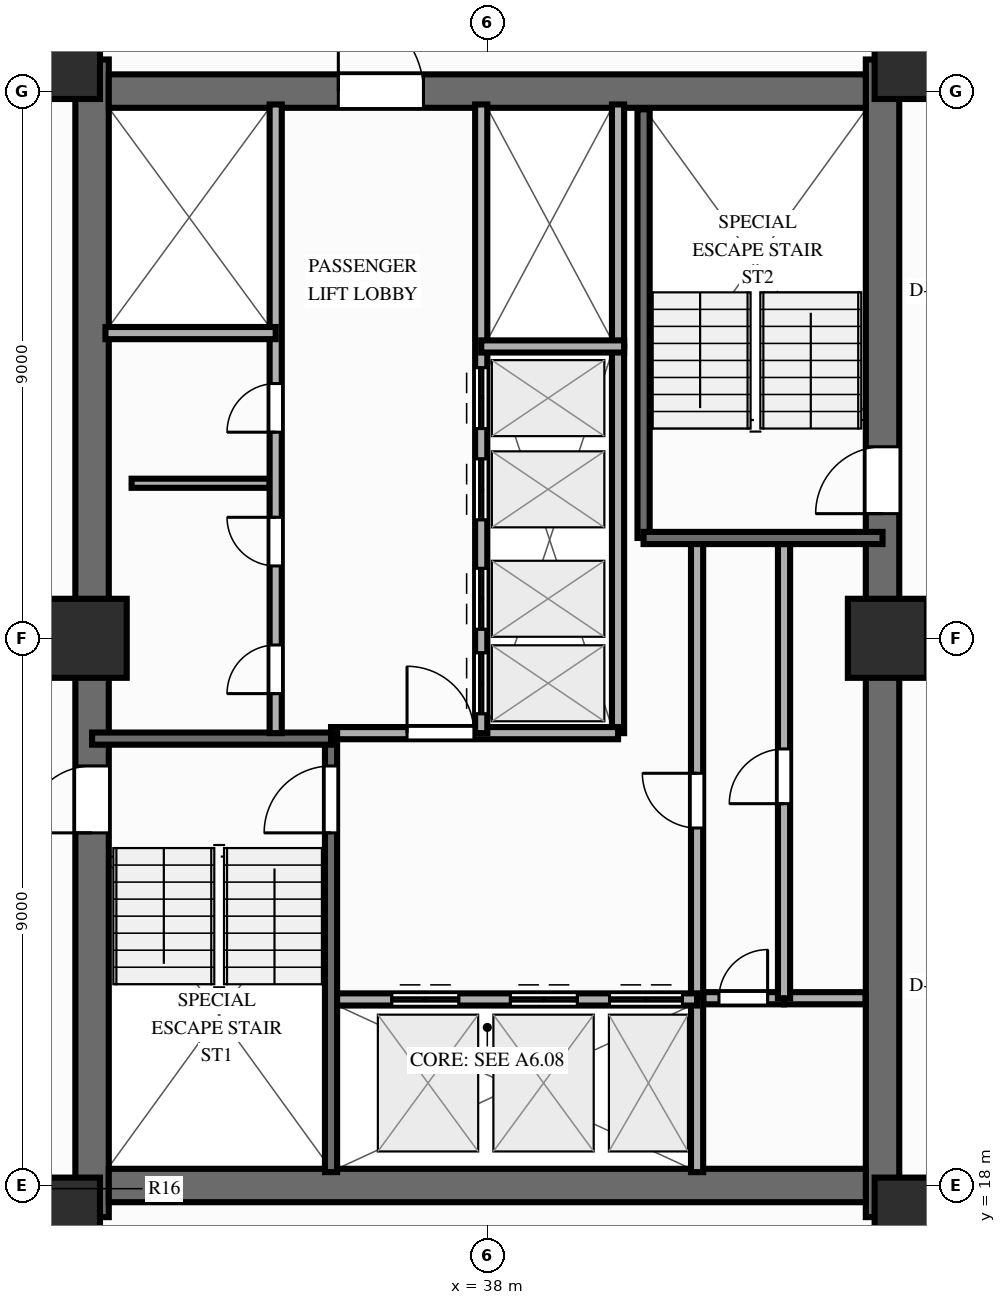
"""IFC4 building model, lengths in metres.
Left out: names, types, materials, properties, quantities, classifications, styles, units other than length and angle.
Written with IfcOpenShell. Run it as: python <this file> out.ifc"""

import sys

from ifc_helpers import new_model, si_unit, direction, frame, frame_2d, origin, origin_2d, place, context, subcontext, project, spatial, rectangle, extrude, source, transform, mapped, element, fill, save


model = new_model("IFC4")
c1 = context("Model", 3, precision=1e-05, world=origin(), true_north=direction((0.0, 1.0)))
c2 = subcontext(c1, "Body", "Model", "MODEL_VIEW")
j1 = project(units=[si_unit("LENGTHUNIT", "METRE"), si_unit("PLANEANGLEUNIT", "RADIAN")], contexts=[c1])
p1 = place(None, origin())
s1 = spatial("IfcSite", under=j1, at=p1, CompositionType="ELEMENT")
p2 = place(p1, origin())
s2 = spatial("IfcBuilding", under=s1, at=p2, CompositionType="ELEMENT")
p3 = place(p2, frame((0.0, 0.0, 110.85)))
s3 = spatial("IfcBuildingStorey", under=s2, at=p3, CompositionType="ELEMENT", Elevation=110.85)
p4 = place(p3, frame((31.5, 17.48, 0.0), z_axis=(0.0, 0.0, 1.0), x_axis=(0.0, 1.0, 0.0)))
e1 = element("IfcWall", 1, at=p4, inside=s3, PredefinedType="SHEAR", context=c2, shape_type="SweptSolid", body=[
    extrude(rectangle(XDim=19.04, YDim=0.55, at=frame_2d((9.52, 0.0))), origin(), (0.0, 0.0, 1.0), 3.0),
])
p5 = place(p4, frame((6.32, 0.0, 0.0)))
e2 = element("IfcOpeningElement", 2, at=p5, cuts=e1, PredefinedType="OPENING", context=c2, shape_type="SweptSolid", body=[
    extrude(rectangle(XDim=1.1, YDim=2.15, at=frame_2d((0.55, 1.075))), frame((0.0, 0.287, 0.0), z_axis=(0.0, -1.0, 0.0), x_axis=(1.0, 0.0, 0.0)), (0.0, 0.0, 1.0), 0.574),
])
p6 = place(p3, frame((44.5, 17.48, 0.0), z_axis=(0.0, 0.0, 1.0), x_axis=(0.0, 1.0, 0.0)))
e3 = element("IfcWall", 3, at=p6, inside=s3, PredefinedType="SHEAR", context=c2, shape_type="SweptSolid", body=[
    extrude(rectangle(XDim=19.04, YDim=0.55, at=frame_2d((9.52, 0.0))), origin(), (0.0, 0.0, 1.0), 3.0),
])
p7 = place(p6, frame((12.67, 0.0, 0.0), z_axis=(0.0, 0.0, 1.0), x_axis=(-1.0, 0.0, 0.0)))
e4 = element("IfcOpeningElement", 4, at=p7, cuts=e3, PredefinedType="OPENING", context=c2, shape_type="SweptSolid", body=[
    extrude(rectangle(XDim=1.1, YDim=2.15, at=frame_2d((0.55, 1.075))), frame((0.0, 0.287, 0.0), z_axis=(0.0, -1.0, 0.0), x_axis=(1.0, 0.0, 0.0)), (0.0, 0.0, 1.0), 0.574),
])
p8 = place(p3, frame((31.775, 18.0, 0.0), z_axis=(0.0, 0.0, 1.0), x_axis=(1.0, 0.0, 0.0)))
e5 = element("IfcWall", 5, at=p8, inside=s3, PredefinedType="SHEAR", context=c2, shape_type="SweptSolid", body=[
    extrude(rectangle(XDim=12.45, YDim=0.55, at=frame_2d((6.225, 0.0))), origin(), (0.0, 0.0, 1.0), 3.0),
])
p9 = place(p3, frame((31.775, 36.0, 0.0), z_axis=(0.0, 0.0, 1.0), x_axis=(1.0, 0.0, 0.0)))
e6 = element("IfcWall", 6, at=p9, inside=s3, PredefinedType="SHEAR", context=c2, shape_type="SweptSolid", body=[
    extrude(rectangle(XDim=12.45, YDim=0.55, at=frame_2d((6.225, 0.0))), origin(), (0.0, 0.0, 1.0), 3.0),
])
p10 = place(p9, frame((5.175, 0.0, 0.0), z_axis=(0.0, 0.0, 1.0), x_axis=(-1.0, 0.0, 0.0)))
e7 = element("IfcOpeningElement", 7, at=p10, cuts=e6, PredefinedType="OPENING", context=c2, shape_type="SweptSolid", body=[
    extrude(rectangle(XDim=1.4, YDim=2.15, at=frame_2d((0.7, 1.075))), frame((0.0, 0.287, 0.0), z_axis=(0.0, -1.0, 0.0), x_axis=(1.0, 0.0, 0.0)), (0.0, 0.0, 1.0), 0.574),
])
m1 = source(origin(), c2, "Body", "SweptSolid", [
    extrude(rectangle(XDim=1.3, YDim=1.3, at=origin_2d()), origin(), (0.0, 0.0, 1.0), 3.0),
])
for number, where, z_axis, x_axis in (
    (8, (30.98, 17.48, 0.0), (0.0, 0.0, 1.0), (1.0, 0.0, 0.0)),
    (9, (45.02, 17.48, 0.0), (0.0, 0.0, 1.0), (1.0, 0.0, 0.0)),
    (10, (30.98, 36.52, 0.0), (0.0, 0.0, 1.0), (1.0, 0.0, 0.0)),
    (11, (45.02, 36.52, 0.0), (0.0, 0.0, 1.0), (1.0, 0.0, 0.0)),
    (12, (31.42, 27.0, 0.0), (0.0, 0.0, 1.0), (1.0, 0.0, 0.0)),
    (13, (44.58, 27.0, 0.0), (0.0, 0.0, 1.0), (1.0, 0.0, 0.0)),
):
    element("IfcColumn", number, at=place(p3, frame(where, z_axis=z_axis, x_axis=x_axis)), inside=s3, PredefinedType="COLUMN", context=c2, shape_type="MappedRepresentation", body=[
        mapped(m1, transform((0.0, 0.0, 0.0), scale=1.0)),
    ])
p11 = place(p3, frame((32.15, 29.55, 0.0), z_axis=(0.0, 0.0, 1.0), x_axis=(1.0, 0.0, 0.0)))
e14 = element("IfcWall", 14, at=p11, inside=s3, PredefinedType="PARTITIONING", context=c2, shape_type="SweptSolid", body=[
    extrude(rectangle(XDim=2.27, YDim=0.15, at=frame_2d((1.135, 0.0))), origin(), (0.0, 0.0, 1.0), 2.79),
])
p12 = place(p3, frame((41.55, 21.08, 0.0), z_axis=(0.0, 0.0, 1.0), x_axis=(1.0, 0.0, 0.0)))
e15 = element("IfcWall", 15, at=p12, inside=s3, PredefinedType="PARTITIONING", context=c2, shape_type="SweptSolid", body=[
    extrude(rectangle(XDim=1.33, YDim=0.2, at=frame_2d((0.665, 0.0))), origin(), (0.0, 0.0, 1.0), 2.79),
])
p13 = place(p12, frame((0.26, 0.0, 0.0)))
e16 = element("IfcOpeningElement", 16, at=p13, cuts=e15, PredefinedType="OPENING", context=c2, shape_type="SweptSolid", body=[
    extrude(rectangle(XDim=0.8, YDim=2.05, at=frame_2d((0.4, 1.025))), frame((0.0, 0.112, 0.0), z_axis=(0.0, -1.0, 0.0), x_axis=(1.0, 0.0, 0.0)), (0.0, 0.0, 1.0), 0.224),
])
p14 = place(p3, frame((42.88, 21.08, 0.0), z_axis=(0.0, 0.0, 1.0), x_axis=(1.0, 0.0, 0.0)))
e17 = element("IfcWall", 17, at=p14, inside=s3, PredefinedType="PARTITIONING", context=c2, shape_type="SweptSolid", body=[
    extrude(rectangle(XDim=1.34, YDim=0.2, at=frame_2d((0.67, 0.0))), origin(), (0.0, 0.0, 1.0), 2.79),
])
p15 = place(p3, frame((42.88, 21.08, 0.0), z_axis=(0.0, 0.0, 1.0), x_axis=(0.0, 1.0, 0.0)))
e18 = element("IfcWall", 18, at=p15, inside=s3, PredefinedType="PARTITIONING", context=c2, shape_type="SweptSolid", body=[
    extrude(rectangle(XDim=7.47, YDim=0.2, at=frame_2d((3.735, 0.0))), origin(), (0.0, 0.0, 1.0), 2.79),
])
p16 = place(p15, frame((3.2, 0.0, 0.0)))
e19 = element("IfcOpeningElement", 19, at=p16, cuts=e18, PredefinedType="OPENING", context=c2, shape_type="SweptSolid", body=[
    extrude(rectangle(XDim=0.9, YDim=2.1, at=frame_2d((0.45, 1.05))), frame((0.0, 0.112, 0.0), z_axis=(0.0, -1.0, 0.0), x_axis=(1.0, 0.0, 0.0)), (0.0, 0.0, 1.0), 0.224),
])
p17 = place(p3, frame((41.45, 18.22, 0.0), z_axis=(0.0, 0.0, 1.0), x_axis=(0.0, 1.0, 0.0)))
e20 = element("IfcWall", 20, at=p17, inside=s3, PredefinedType="PARTITIONING", context=c2, shape_type="SweptSolid", body=[
    extrude(rectangle(XDim=2.86, YDim=0.2, at=frame_2d((1.43, 0.0))), origin(), (0.0, 0.0, 1.0), 2.79),
])
p18 = place(p3, frame((41.45, 21.08, 0.0), z_axis=(0.0, 0.0, 1.0), x_axis=(0.0, 1.0, 0.0)))
e21 = element("IfcWall", 21, at=p18, inside=s3, PredefinedType="PARTITIONING", context=c2, shape_type="SweptSolid", body=[
    extrude(rectangle(XDim=7.52, YDim=0.2, at=frame_2d((3.76, 0.0))), origin(), (0.0, 0.0, 1.0), 2.79),
])
p19 = place(p18, frame((2.8, 0.0, 0.0)))
e22 = element("IfcOpeningElement", 22, at=p19, cuts=e21, PredefinedType="OPENING", context=c2, shape_type="SweptSolid", body=[
    extrude(rectangle(XDim=0.9, YDim=2.1, at=frame_2d((0.45, 1.05))), frame((0.0, 0.112, 0.0), z_axis=(0.0, -1.0, 0.0), x_axis=(1.0, 0.0, 0.0)), (0.0, 0.0, 1.0), 0.224),
])
p20 = place(p3, frame((40.15, 25.44, 0.0), z_axis=(0.0, 0.0, 1.0), x_axis=(0.0, 1.0, 0.0)))
e23 = element("IfcWall", 23, at=p20, inside=s3, PredefinedType="PARTITIONING", context=c2, shape_type="SweptSolid", body=[
    extrude(rectangle(XDim=6.36, YDim=0.2, at=frame_2d((3.18, 0.0))), origin(), (0.0, 0.0, 1.0), 2.79),
])
p21 = place(p3, frame((40.15, 31.8, 0.0), z_axis=(0.0, 0.0, 1.0), x_axis=(0.0, 1.0, 0.0)))
e24 = element("IfcWall", 24, at=p21, inside=s3, PredefinedType="PARTITIONING", context=c2, shape_type="SweptSolid", body=[
    extrude(rectangle(XDim=3.98, YDim=0.2, at=frame_2d((1.99, 0.0))), origin(), (0.0, 0.0, 1.0), 2.79),
])
p22 = place(p3, frame((35.43, 21.06, 0.0), z_axis=(0.0, 0.0, 1.0), x_axis=(1.0, 0.0, 0.0)))
e25 = element("IfcWall", 25, at=p22, inside=s3, PredefinedType="PARTITIONING", context=c2, shape_type="SweptSolid", body=[
    extrude(rectangle(XDim=6.02, YDim=0.2, at=frame_2d((3.01, 0.0))), origin(), (0.0, 0.0, 1.0), 2.79),
])
p23 = place(p22, frame((1.0, 0.0, 0.0)))
e26 = element("IfcOpeningElement", 26, at=p23, cuts=e25, PredefinedType="OPENING", context=c2, shape_type="SweptSolid", body=[
    extrude(rectangle(XDim=1.1, YDim=2.15, at=frame_2d((0.55, 1.075))), frame((0.0, 0.112, 0.0), z_axis=(0.0, -1.0, 0.0), x_axis=(1.0, 0.0, 0.0)), (0.0, 0.0, 1.0), 0.224),
])
p24 = place(p22, frame((2.95, 0.0, 0.0)))
e27 = element("IfcOpeningElement", 27, at=p24, cuts=e25, PredefinedType="OPENING", context=c2, shape_type="SweptSolid", body=[
    extrude(rectangle(XDim=1.1, YDim=2.15, at=frame_2d((0.55, 1.075))), frame((0.0, 0.112, 0.0), z_axis=(0.0, -1.0, 0.0), x_axis=(1.0, 0.0, 0.0)), (0.0, 0.0, 1.0), 0.224),
])
p25 = place(p22, frame((4.58, 0.0, 0.0)))
e28 = element("IfcOpeningElement", 28, at=p25, cuts=e25, PredefinedType="OPENING", context=c2, shape_type="SweptSolid", body=[
    extrude(rectangle(XDim=1.2, YDim=2.15, at=frame_2d((0.6, 1.075))), frame((0.0, 0.112, 0.0), z_axis=(0.0, -1.0, 0.0), x_axis=(1.0, 0.0, 0.0)), (0.0, 0.0, 1.0), 0.224),
])
p26 = place(p3, frame((35.43, 25.44, 0.0), z_axis=(0.0, 0.0, 1.0), x_axis=(1.0, 0.0, 0.0)))
e29 = element("IfcWall", 29, at=p26, inside=s3, PredefinedType="PARTITIONING", context=c2, shape_type="SweptSolid", body=[
    extrude(rectangle(XDim=4.72, YDim=0.2, at=frame_2d((2.36, 0.0))), origin(), (0.0, 0.0, 1.0), 2.79),
])
p27 = place(p26, frame((1.25, 0.0, 0.0)))
e30 = element("IfcOpeningElement", 30, at=p27, cuts=e29, PredefinedType="OPENING", context=c2, shape_type="SweptSolid", body=[
    extrude(rectangle(XDim=1.1, YDim=2.15, at=frame_2d((0.55, 1.075))), frame((0.0, 0.112, 0.0), z_axis=(0.0, -1.0, 0.0), x_axis=(1.0, 0.0, 0.0)), (0.0, 0.0, 1.0), 0.224),
])
p28 = place(p3, frame((35.43, 18.22, 0.0), z_axis=(0.0, 0.0, 1.0), x_axis=(0.0, 1.0, 0.0)))
e31 = element("IfcWall", 31, at=p28, inside=s3, PredefinedType="SOLIDWALL", context=c2, shape_type="SweptSolid", body=[
    extrude(rectangle(XDim=7.22, YDim=0.2, at=frame_2d((3.61, 0.0))), origin(), (0.0, 0.0, 1.0), 2.79),
])
p29 = place(p28, frame((6.68, 0.0, 0.0), z_axis=(0.0, 0.0, 1.0), x_axis=(-1.0, 0.0, 0.0)))
e32 = element("IfcOpeningElement", 32, at=p29, cuts=e31, PredefinedType="OPENING", context=c2, shape_type="SweptSolid", body=[
    extrude(rectangle(XDim=1.1, YDim=2.15, at=frame_2d((0.55, 1.075))), frame((0.0, 0.112, 0.0), z_axis=(0.0, -1.0, 0.0), x_axis=(1.0, 0.0, 0.0)), (0.0, 0.0, 1.0), 0.224),
])
p30 = place(p3, frame((31.5, 25.35, 0.0), z_axis=(0.0, 0.0, 1.0), x_axis=(1.0, 0.0, 0.0)))
e33 = element("IfcWall", 33, at=p30, inside=s3, PredefinedType="SOLIDWALL", context=c2, shape_type="SweptSolid", body=[
    extrude(rectangle(XDim=3.93, YDim=0.2, at=frame_2d((1.965, 0.0))), origin(), (0.0, 0.0, 1.0), 2.79),
])
p31 = place(p3, frame((40.57, 28.65, 0.0), z_axis=(0.0, 0.0, 1.0), x_axis=(0.0, 1.0, 0.0)))
e34 = element("IfcWall", 34, at=p31, inside=s3, PredefinedType="SOLIDWALL", context=c2, shape_type="SweptSolid", body=[
    extrude(rectangle(XDim=7.05, YDim=0.2, at=frame_2d((3.525, 0.0))), origin(), (0.0, 0.0, 1.0), 2.79),
])
p32 = place(p3, frame((40.57, 28.65, 0.0), z_axis=(0.0, 0.0, 1.0), x_axis=(1.0, 0.0, 0.0)))
e35 = element("IfcWall", 35, at=p32, inside=s3, PredefinedType="SOLIDWALL", context=c2, shape_type="SweptSolid", body=[
    extrude(rectangle(XDim=3.93, YDim=0.2, at=frame_2d((1.965, 0.0))), origin(), (0.0, 0.0, 1.0), 2.79),
])
p33 = place(p3, frame((34.52, 25.44, 0.0), z_axis=(0.0, 0.0, 1.0), x_axis=(0.0, 1.0, 0.0)))
e36 = element("IfcWall", 36, at=p33, inside=s3, PredefinedType="PARTITIONING", context=c2, shape_type="SweptSolid", body=[
    extrude(rectangle(XDim=10.34, YDim=0.2, at=frame_2d((5.17, 0.0))), origin(), (0.0, 0.0, 1.0), 2.79),
])
p34 = place(p33, frame((0.65, 0.0, 0.0)))
e37 = element("IfcOpeningElement", 37, at=p34, cuts=e36, PredefinedType="OPENING", context=c2, shape_type="SweptSolid", body=[
    extrude(rectangle(XDim=0.8, YDim=2.05, at=frame_2d((0.4, 1.025))), frame((0.0, 0.112, 0.0), z_axis=(0.0, -1.0, 0.0), x_axis=(1.0, 0.0, 0.0)), (0.0, 0.0, 1.0), 0.224),
])
p35 = place(p33, frame((2.75, 0.0, 0.0)))
e38 = element("IfcOpeningElement", 38, at=p35, cuts=e36, PredefinedType="OPENING", context=c2, shape_type="SweptSolid", body=[
    extrude(rectangle(XDim=0.8, YDim=2.05, at=frame_2d((0.4, 1.025))), frame((0.0, 0.112, 0.0), z_axis=(0.0, -1.0, 0.0), x_axis=(1.0, 0.0, 0.0)), (0.0, 0.0, 1.0), 0.224),
])
p36 = place(p33, frame((4.95, 0.0, 0.0)))
e39 = element("IfcOpeningElement", 39, at=p36, cuts=e36, PredefinedType="OPENING", context=c2, shape_type="SweptSolid", body=[
    extrude(rectangle(XDim=0.8, YDim=2.05, at=frame_2d((0.4, 1.025))), frame((0.0, 0.112, 0.0), z_axis=(0.0, -1.0, 0.0), x_axis=(1.0, 0.0, 0.0)), (0.0, 0.0, 1.0), 0.224),
])
p37 = place(p3, frame((31.72, 32.02, 0.0), z_axis=(0.0, 0.0, 1.0), x_axis=(1.0, 0.0, 0.0)))
e40 = element("IfcWall", 40, at=p37, inside=s3, PredefinedType="PARTITIONING", context=c2, shape_type="SweptSolid", body=[
    extrude(rectangle(XDim=2.8, YDim=0.2, at=frame_2d((1.4, 0.0))), origin(), (0.0, 0.0, 1.0), 2.79),
])
p38 = place(p3, frame((37.9, 25.44, 0.0), z_axis=(0.0, 0.0, 1.0), x_axis=(0.0, 1.0, 0.0)))
e41 = element("IfcWall", 41, at=p38, inside=s3, PredefinedType="PARTITIONING", context=c2, shape_type="SweptSolid", body=[
    extrude(rectangle(XDim=10.34, YDim=0.2, at=frame_2d((5.17, 0.0))), origin(), (0.0, 0.0, 1.0), 2.79),
])
p39 = place(p38, frame((0.32, 0.0, 0.0)))
e42 = element("IfcOpeningElement", 42, at=p39, cuts=e41, PredefinedType="OPENING", context=c2, shape_type="SweptSolid", body=[
    extrude(rectangle(XDim=1.0, YDim=2.15, at=frame_2d((0.5, 1.075))), frame((0.0, 0.112, 0.0), z_axis=(0.0, -1.0, 0.0), x_axis=(1.0, 0.0, 0.0)), (0.0, 0.0, 1.0), 0.224),
])
p40 = place(p38, frame((1.71, 0.0, 0.0)))
e43 = element("IfcOpeningElement", 43, at=p40, cuts=e41, PredefinedType="OPENING", context=c2, shape_type="SweptSolid", body=[
    extrude(rectangle(XDim=1.0, YDim=2.15, at=frame_2d((0.5, 1.075))), frame((0.0, 0.112, 0.0), z_axis=(0.0, -1.0, 0.0), x_axis=(1.0, 0.0, 0.0)), (0.0, 0.0, 1.0), 0.224),
])
p41 = place(p38, frame((3.51, 0.0, 0.0)))
e44 = element("IfcOpeningElement", 44, at=p41, cuts=e41, PredefinedType="OPENING", context=c2, shape_type="SweptSolid", body=[
    extrude(rectangle(XDim=1.0, YDim=2.15, at=frame_2d((0.5, 1.075))), frame((0.0, 0.112, 0.0), z_axis=(0.0, -1.0, 0.0), x_axis=(1.0, 0.0, 0.0)), (0.0, 0.0, 1.0), 0.224),
])
p42 = place(p38, frame((5.01, 0.0, 0.0)))
e45 = element("IfcOpeningElement", 45, at=p42, cuts=e41, PredefinedType="OPENING", context=c2, shape_type="SweptSolid", body=[
    extrude(rectangle(XDim=1.0, YDim=2.15, at=frame_2d((0.5, 1.075))), frame((0.0, 0.112, 0.0), z_axis=(0.0, -1.0, 0.0), x_axis=(1.0, 0.0, 0.0)), (0.0, 0.0, 1.0), 0.224),
])
p43 = place(p3, frame((37.9, 31.8, 0.0), z_axis=(0.0, 0.0, 1.0), x_axis=(1.0, 0.0, 0.0)))
e46 = element("IfcWall", 46, at=p43, inside=s3, PredefinedType="PARTITIONING", context=c2, shape_type="SweptSolid", body=[
    extrude(rectangle(XDim=2.35, YDim=0.2, at=frame_2d((1.175, 0.0))), origin(), (0.0, 0.0, 1.0), 2.79),
])
m2 = source(origin(), c2, "Body", "SweptSolid", [
    extrude(rectangle(XDim=1.1, YDim=2.15, at=frame_2d((0.55, 1.075))), frame((0.0, 0.025, 0.0), z_axis=(0.0, -1.0, 0.0), x_axis=(1.0, 0.0, 0.0)), (0.0, 0.0, 1.0), 0.05),
])
p44 = place(p5, origin())
e47 = element("IfcDoor", 47, at=p44, inside=s3, OperationType="SINGLE_SWING_LEFT", PredefinedType="DOOR", context=c2, shape_type="MappedRepresentation", body=[
    mapped(m2, transform((0.0, 0.0, 0.0), scale=1.0)),
])
fill(e2, e47)
p45 = place(p7, origin())
e48 = element("IfcDoor", 48, at=p45, inside=s3, OperationType="SINGLE_SWING_RIGHT", PredefinedType="DOOR", context=c2, shape_type="MappedRepresentation", body=[
    mapped(m2, transform((0.0, 0.0, 0.0), scale=1.0)),
])
fill(e4, e48)
m3 = source(origin(), c2, "Body", "SweptSolid", [
    extrude(rectangle(XDim=1.4, YDim=2.15, at=frame_2d((0.7, 1.075))), frame((0.0, 0.025, 0.0), z_axis=(0.0, -1.0, 0.0), x_axis=(1.0, 0.0, 0.0)), (0.0, 0.0, 1.0), 0.05),
])
p46 = place(p10, origin())
e49 = element("IfcDoor", 49, at=p46, inside=s3, OperationType="SINGLE_SWING_RIGHT", PredefinedType="DOOR", context=c2, shape_type="MappedRepresentation", body=[
    mapped(m3, transform((0.0, 0.0, 0.0), scale=1.0)),
])
fill(e7, e49)
m4 = source(origin(), c2, "Body", "SweptSolid", [
    extrude(rectangle(XDim=0.8, YDim=2.05, at=frame_2d((0.4, 1.025))), frame((0.0, 0.025, 0.0), z_axis=(0.0, -1.0, 0.0), x_axis=(1.0, 0.0, 0.0)), (0.0, 0.0, 1.0), 0.05),
])
p47 = place(p13, origin())
e50 = element("IfcDoor", 50, at=p47, inside=s3, OperationType="SINGLE_SWING_RIGHT", PredefinedType="DOOR", context=c2, shape_type="MappedRepresentation", body=[
    mapped(m4, transform((0.0, 0.0, 0.0), scale=1.0)),
])
fill(e16, e50)
m5 = source(origin(), c2, "Body", "SweptSolid", [
    extrude(rectangle(XDim=0.9, YDim=2.1, at=frame_2d((0.45, 1.05))), frame((0.0, 0.025, 0.0), z_axis=(0.0, -1.0, 0.0), x_axis=(1.0, 0.0, 0.0)), (0.0, 0.0, 1.0), 0.05),
])
p48 = place(p16, origin())
e51 = element("IfcDoor", 51, at=p48, inside=s3, OperationType="SINGLE_SWING_LEFT", PredefinedType="DOOR", context=c2, shape_type="MappedRepresentation", body=[
    mapped(m5, transform((0.0, 0.0, 0.0), scale=1.0)),
])
fill(e19, e51)
p49 = place(p19, origin())
e52 = element("IfcDoor", 52, at=p49, inside=s3, OperationType="SINGLE_SWING_RIGHT", PredefinedType="DOOR", context=c2, shape_type="MappedRepresentation", body=[
    mapped(m5, transform((0.0, 0.0, 0.0), scale=1.0)),
])
fill(e22, e52)
p50 = place(p23, origin())
e53 = element("IfcDoor", 53, at=p50, inside=s3, OperationType="DOUBLE_DOOR_SLIDING", PredefinedType="DOOR", context=c2, shape_type="MappedRepresentation", body=[
    mapped(m2, transform((0.0, 0.0, 0.0), scale=1.0)),
])
fill(e26, e53)
p51 = place(p24, origin())
e54 = element("IfcDoor", 54, at=p51, inside=s3, OperationType="DOUBLE_DOOR_SLIDING", PredefinedType="DOOR", context=c2, shape_type="MappedRepresentation", body=[
    mapped(m2, transform((0.0, 0.0, 0.0), scale=1.0)),
])
fill(e27, e54)
m6 = source(origin(), c2, "Body", "SweptSolid", [
    extrude(rectangle(XDim=1.2, YDim=2.15, at=frame_2d((0.6, 1.075))), frame((0.0, 0.025, 0.0), z_axis=(0.0, -1.0, 0.0), x_axis=(1.0, 0.0, 0.0)), (0.0, 0.0, 1.0), 0.05),
])
p52 = place(p25, origin())
e55 = element("IfcDoor", 55, at=p52, inside=s3, OperationType="DOUBLE_DOOR_SLIDING", PredefinedType="DOOR", context=c2, shape_type="MappedRepresentation", body=[
    mapped(m6, transform((0.0, 0.0, 0.0), scale=1.0)),
])
fill(e28, e55)
p53 = place(p27, origin())
e56 = element("IfcDoor", 56, at=p53, inside=s3, OperationType="SINGLE_SWING_LEFT", PredefinedType="DOOR", context=c2, shape_type="MappedRepresentation", body=[
    mapped(m2, transform((0.0, 0.0, 0.0), scale=1.0)),
])
fill(e30, e56)
p54 = place(p29, origin())
e57 = element("IfcDoor", 57, at=p54, inside=s3, OperationType="SINGLE_SWING_RIGHT", PredefinedType="DOOR", context=c2, shape_type="MappedRepresentation", body=[
    mapped(m2, transform((0.0, 0.0, 0.0), scale=1.0)),
])
fill(e32, e57)
p55 = place(p34, origin())
e58 = element("IfcDoor", 58, at=p55, inside=s3, OperationType="SINGLE_SWING_LEFT", PredefinedType="DOOR", context=c2, shape_type="MappedRepresentation", body=[
    mapped(m4, transform((0.0, 0.0, 0.0), scale=1.0)),
])
fill(e37, e58)
p56 = place(p35, origin())
e59 = element("IfcDoor", 59, at=p56, inside=s3, OperationType="SINGLE_SWING_RIGHT", PredefinedType="DOOR", context=c2, shape_type="MappedRepresentation", body=[
    mapped(m4, transform((0.0, 0.0, 0.0), scale=1.0)),
])
fill(e38, e59)
p57 = place(p36, origin())
e60 = element("IfcDoor", 60, at=p57, inside=s3, OperationType="SINGLE_SWING_LEFT", PredefinedType="DOOR", context=c2, shape_type="MappedRepresentation", body=[
    mapped(m4, transform((0.0, 0.0, 0.0), scale=1.0)),
])
fill(e39, e60)
m7 = source(origin(), c2, "Body", "SweptSolid", [
    extrude(rectangle(XDim=1.0, YDim=2.15, at=frame_2d((0.5, 1.075))), frame((0.0, 0.025, 0.0), z_axis=(0.0, -1.0, 0.0), x_axis=(1.0, 0.0, 0.0)), (0.0, 0.0, 1.0), 0.05),
])
p58 = place(p39, origin())
e61 = element("IfcDoor", 61, at=p58, inside=s3, OperationType="DOUBLE_DOOR_SLIDING", PredefinedType="DOOR", context=c2, shape_type="MappedRepresentation", body=[
    mapped(m7, transform((0.0, 0.0, 0.0), scale=1.0)),
])
fill(e42, e61)
p59 = place(p40, origin())
e62 = element("IfcDoor", 62, at=p59, inside=s3, OperationType="DOUBLE_DOOR_SLIDING", PredefinedType="DOOR", context=c2, shape_type="MappedRepresentation", body=[
    mapped(m7, transform((0.0, 0.0, 0.0), scale=1.0)),
])
fill(e43, e62)
p60 = place(p41, origin())
e63 = element("IfcDoor", 63, at=p60, inside=s3, OperationType="DOUBLE_DOOR_SLIDING", PredefinedType="DOOR", context=c2, shape_type="MappedRepresentation", body=[
    mapped(m7, transform((0.0, 0.0, 0.0), scale=1.0)),
])
fill(e44, e63)
p61 = place(p42, origin())
e64 = element("IfcDoor", 64, at=p61, inside=s3, OperationType="DOUBLE_DOOR_SLIDING", PredefinedType="DOOR", context=c2, shape_type="MappedRepresentation", body=[
    mapped(m7, transform((0.0, 0.0, 0.0), scale=1.0)),
])
fill(e45, e64)
save(model, sys.argv[1])
